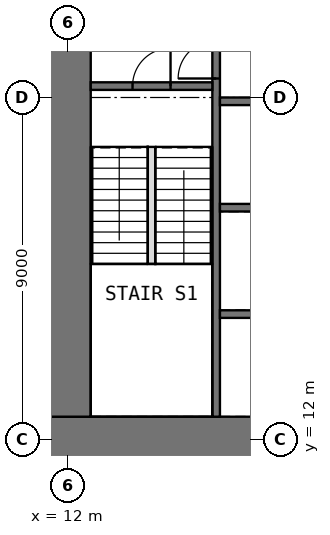
"""IFC4 building model, lengths in metres.
Left out: names, types, materials, properties, quantities, classifications, styles, units other than length and angle.
Written with IfcOpenShell. Run it as: python <this file> out.ifc"""

import sys

from ifc_helpers import new_model, si_unit, direction, frame, frame_2d, origin, place, context, subcontext, project, spatial, rectangle, extrude, element, fill, save


model = new_model("IFC4")
c1 = context("Model", 3, precision=1e-05, world=origin(), true_north=direction((0.0, 1.0)))
c2 = subcontext(c1, "Body", "Model", "MODEL_VIEW")
j1 = project(units=[si_unit("LENGTHUNIT", "METRE"), si_unit("PLANEANGLEUNIT", "RADIAN")], contexts=[c1])
p1 = place(None, origin())
s1 = spatial("IfcSite", under=j1, at=p1, CompositionType="ELEMENT")
p2 = place(p1, origin())
s2 = spatial("IfcBuilding", under=s1, at=p2, CompositionType="ELEMENT")
p3 = place(p2, frame((0.0, 0.0, 82.5)))
s3 = spatial("IfcBuildingStorey", under=s2, at=p3, CompositionType="ELEMENT", Elevation=82.5)
p4 = place(p3, frame((10.8, 11.7, -0.05), z_axis=(0.0, 0.0, 1.0), x_axis=(1.0, 0.0, 0.0)))
e1 = element("IfcWall", 1, at=p4, inside=s3, PredefinedType="SHEAR", context=c2, shape_type="SweptSolid", body=[
    extrude(rectangle(XDim=20.4, YDim=1.8, at=frame_2d((10.2, 0.0))), origin(), (0.0, 0.0, 1.0), 3.8),
])
p5 = place(p4, frame((9.2, 0.0, 0.05)))
e2 = element("IfcOpeningElement", 2, at=p5, cuts=e1, PredefinedType="OPENING", context=c2, shape_type="SweptSolid", body=[
    extrude(rectangle(XDim=2.0, YDim=2.2, at=frame_2d((1.0, 1.1))), frame((0.0, 0.91, 0.0), z_axis=(0.0, -1.0, 0.0), x_axis=(1.0, 0.0, 0.0)), (0.0, 0.0, 1.0), 1.82),
])
p6 = place(p3, frame((11.7, 12.6, -0.05), z_axis=(0.0, 0.0, 1.0), x_axis=(0.0, 1.0, 0.0)))
e3 = element("IfcWall", 3, at=p6, inside=s3, PredefinedType="SHEAR", context=c2, shape_type="SweptSolid", body=[
    extrude(rectangle(XDim=16.8, YDim=1.8, at=frame_2d((8.4, 0.0))), origin(), (0.0, 0.0, 1.0), 3.8),
])
p7 = place(p6, frame((9.9, 0.0, 0.05)))
e4 = element("IfcOpeningElement", 4, at=p7, cuts=e3, PredefinedType="OPENING", context=c2, shape_type="SweptSolid", body=[
    extrude(rectangle(XDim=1.0, YDim=2.2, at=frame_2d((0.5, 1.1))), frame((0.0, 0.91, 0.0), z_axis=(0.0, -1.0, 0.0), x_axis=(1.0, 0.0, 0.0)), (0.0, 0.0, 1.0), 1.82),
])
p8 = place(p3, frame((15.9, 12.6, -0.05), z_axis=(0.0, 0.0, 1.0), x_axis=(0.0, 1.0, 0.0)))
e5 = element("IfcWall", 5, at=p8, inside=s3, PredefinedType="SHEAR", context=c2, shape_type="SweptSolid", body=[
    extrude(rectangle(XDim=16.8, YDim=0.2, at=frame_2d((8.4, 0.0))), origin(), (0.0, 0.0, 1.0), 3.8),
])
p9 = place(p8, frame((8.9, 0.0, 0.05)))
e6 = element("IfcOpeningElement", 6, at=p9, cuts=e5, PredefinedType="OPENING", context=c2, shape_type="SweptSolid", body=[
    extrude(rectangle(XDim=1.0, YDim=2.2, at=frame_2d((0.5, 1.1))), frame((0.0, 0.11, 0.0), z_axis=(0.0, -1.0, 0.0), x_axis=(1.0, 0.0, 0.0)), (0.0, 0.0, 1.0), 0.22),
])
p10 = place(p3, frame((12.6, 21.3, -0.05), z_axis=(0.0, 0.0, 1.0), x_axis=(1.0, 0.0, 0.0)))
e7 = element("IfcWall", 7, at=p10, inside=s3, PredefinedType="SHEAR", context=c2, shape_type="SweptSolid", body=[
    extrude(rectangle(XDim=3.2, YDim=0.2, at=frame_2d((1.6, 0.0))), origin(), (0.0, 0.0, 1.0), 3.8),
])
p11 = place(p10, frame((1.1, 0.0, 0.05)))
e8 = element("IfcOpeningElement", 8, at=p11, cuts=e7, PredefinedType="OPENING", context=c2, shape_type="SweptSolid", body=[
    extrude(rectangle(XDim=1.0, YDim=2.2, at=frame_2d((0.5, 1.1))), frame((0.0, 0.11, 0.0), z_axis=(0.0, -1.0, 0.0), x_axis=(1.0, 0.0, 0.0)), (0.0, 0.0, 1.0), 0.22),
])
for number, where, z_axis, x_axis in (
    (9, (16.0, 15.3, -0.05), (0.0, 0.0, 1.0), (1.0, 0.0, 0.0)),
    (10, (16.0, 18.1, -0.05), (0.0, 0.0, 1.0), (1.0, 0.0, 0.0)),
    (11, (16.0, 20.9, -0.05), (0.0, 0.0, 1.0), (1.0, 0.0, 0.0)),
):
    element("IfcWall", number, at=place(p3, frame(where, z_axis=z_axis, x_axis=x_axis)), inside=s3, PredefinedType="SHEAR", context=c2, shape_type="SweptSolid", body=[
        extrude(rectangle(XDim=3.2, YDim=0.2, at=frame_2d((1.6, 0.0))), origin(), (0.0, 0.0, 1.0), 3.8),
    ])
p12 = place(p3, frame((14.2, 16.62, 0.0), z_axis=(0.0, 0.0, 1.0), x_axis=(0.0, 1.0, 0.0)))
e12 = element("IfcWall", 12, at=p12, inside=s3, PredefinedType="PARTITIONING", context=c2, shape_type="SweptSolid", body=[
    extrude(rectangle(XDim=3.08, YDim=0.2, at=frame_2d((1.54, 0.0))), origin(), (0.0, 0.0, 1.0), 4.0),
])
p13 = place(p11, origin())
e13 = element("IfcDoor", 13, at=p13, inside=s3, OperationType="SINGLE_SWING_RIGHT", PredefinedType="DOOR", context=c2, shape_type="SweptSolid", body=[
    extrude(rectangle(XDim=1.0, YDim=2.2, at=frame_2d((0.5, 1.1))), frame((0.0, 0.025, 0.0), z_axis=(0.0, -1.0, 0.0), x_axis=(1.0, 0.0, 0.0)), (0.0, 0.0, 1.0), 0.05),
])
fill(e8, e13)
p14 = place(p9, origin())
e14 = element("IfcDoor", 14, at=p14, inside=s3, OperationType="SINGLE_SWING_LEFT", PredefinedType="DOOR", context=c2, shape_type="SweptSolid", body=[
    extrude(rectangle(XDim=1.0, YDim=2.2, at=frame_2d((0.5, 1.1))), frame((0.0, 0.025, 0.0), z_axis=(0.0, -1.0, 0.0), x_axis=(1.0, 0.0, 0.0)), (0.0, 0.0, 1.0), 0.05),
])
fill(e6, e14)
save(model, sys.argv[1])
